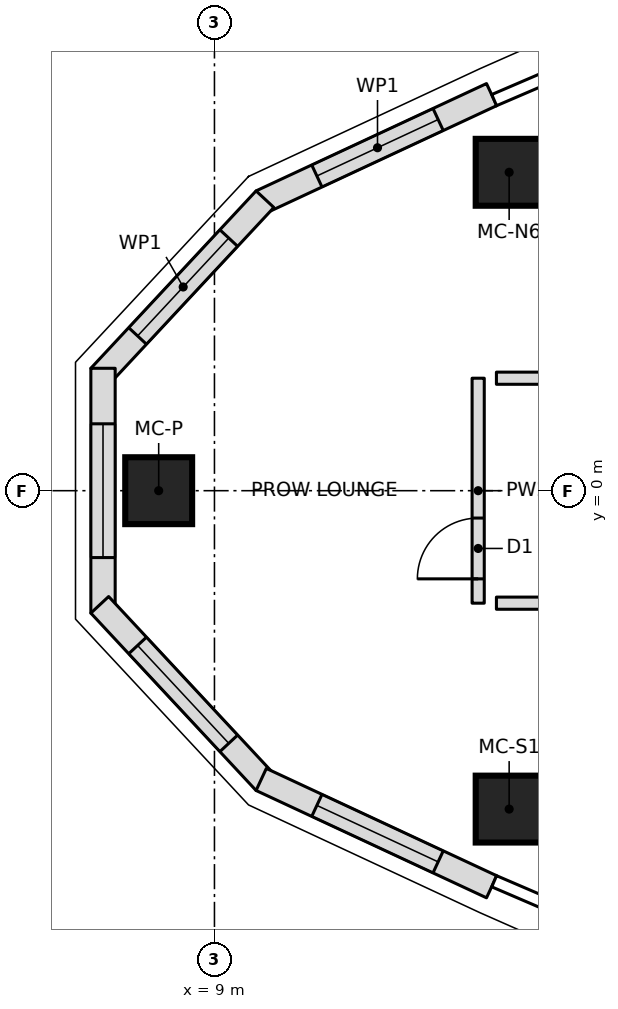
"""IFC4 building model, lengths in metres.
Left out: names, types, materials, properties, quantities, classifications, styles, units other than length and angle.
Written with IfcOpenShell. Run it as: python <this file> out.ifc"""

import sys

from ifc_helpers import new_model, si_unit, direction, frame, frame_2d, origin, origin_2d, place, context, subcontext, project, spatial, polyline, rectangle, outline, extrude, element, fill, save


model = new_model("IFC4")
c1 = context("Model", 3, precision=1e-05, world=origin(), true_north=direction((0.0, 1.0)))
c2 = subcontext(c1, "Body", "Model", "MODEL_VIEW")
j1 = project(units=[si_unit("LENGTHUNIT", "METRE"), si_unit("PLANEANGLEUNIT", "RADIAN")], contexts=[c1])
p1 = place(None, origin())
s1 = spatial("IfcSite", under=j1, at=p1, CompositionType="ELEMENT")
p2 = place(p1, origin())
s2 = spatial("IfcBuilding", under=s1, at=p2, CompositionType="ELEMENT")
p3 = place(p2, frame((0.0, 0.0, 296.3)))
s3 = spatial("IfcBuildingStorey", under=s2, at=p3, CompositionType="ELEMENT", Elevation=296.3)
for number, where, z_axis, x_axis in (
    (1, (8.083, 0.0, 0.0), (0.0, 0.0, 1.0), (1.0, 0.0, 0.0)),
    (2, (13.846, -5.237, 0.0), (0.0, 0.0, 1.0), (1.0, 0.0, 0.0)),
    (3, (13.846, 5.237, 0.0), (0.0, 0.0, 1.0), (1.0, 0.0, 0.0)),
):
    element("IfcColumn", number, at=place(p3, frame(where, z_axis=z_axis, x_axis=x_axis)), inside=s3, PredefinedType="COLUMN", context=c2, shape_type="SweptSolid", body=[
        extrude(rectangle(XDim=1.1, YDim=1.1, at=origin_2d()), origin(), (0.0, 0.0, 1.0), 3.55),
    ])
p4 = place(p3, frame((13.559, 6.515, 0.0), z_axis=(0.0, 0.0, 1.0), x_axis=(-0.906485602396, -0.42223672584, 0.0)))
e4 = element("IfcWall", 4, at=p4, inside=s3, PredefinedType="NOTDEFINED", context=c2, shape_type="SweptSolid", body=[
    extrude(outline(polyline([(0.0, -0.2), (4.181, -0.2), (4.103, 0.2), (0.0, 0.2), (0.0, -0.2)])), origin(), (0.0, 0.0, 1.0), 3.25),
])
p5 = place(p4, frame((0.971, 0.0, 0.6)))
e5 = element("IfcOpeningElement", 5, at=p5, cuts=e4, PredefinedType="OPENING", context=c2, shape_type="SweptSolid", body=[
    extrude(outline(polyline([(0.0, 1.35), (0.084, 1.771), (0.322, 2.128), (0.679, 2.366), (1.1, 2.45), (1.521, 2.366), (1.878, 2.128), (2.116, 1.771), (2.2, 1.35), (2.2, 1.1), (2.116, 0.679), (1.878, 0.322), (1.521, 0.084), (1.1, 0.0), (0.679, 0.084), (0.322, 0.322), (0.084, 0.679), (0.0, 1.1), (0.0, 1.35)])), frame((0.0, 0.21, 0.0), z_axis=(0.0, -1.0, 0.0), x_axis=(1.0, 0.0, 0.0)), (0.0, 0.0, 1.0), 0.42),
])
p6 = place(p3, frame((9.804, 4.766, 0.0), z_axis=(0.0, 0.0, 1.0), x_axis=(-0.6815467277, -0.73177459505, 0.0)))
e6 = element("IfcWall", 6, at=p6, inside=s3, PredefinedType="NOTDEFINED", context=c2, shape_type="SweptSolid", body=[
    extrude(outline(polyline([(-0.039, -0.2), (3.948, -0.2), (3.791, 0.2), (0.039, 0.2), (-0.039, -0.2)])), origin(), (0.0, 0.0, 1.0), 3.25),
])
p7 = place(p6, frame((0.835, 0.0, 0.6)))
e7 = element("IfcOpeningElement", 7, at=p7, cuts=e6, PredefinedType="OPENING", context=c2, shape_type="SweptSolid", body=[
    extrude(outline(polyline([(0.0, 1.35), (0.084, 1.771), (0.322, 2.128), (0.679, 2.366), (1.1, 2.45), (1.521, 2.366), (1.878, 2.128), (2.116, 1.771), (2.2, 1.35), (2.2, 1.1), (2.116, 0.679), (1.878, 0.322), (1.521, 0.084), (1.1, 0.0), (0.679, 0.084), (0.322, 0.322), (0.084, 0.679), (0.0, 1.1), (0.0, 1.35)])), frame((0.0, 0.21, 0.0), z_axis=(0.0, -1.0, 0.0), x_axis=(1.0, 0.0, 0.0)), (0.0, 0.0, 1.0), 0.42),
])
p8 = place(p3, frame((7.167, 1.935, 0.0), z_axis=(0.0, 0.0, 1.0), x_axis=(0.0, -1.0, 0.0)))
e8 = element("IfcWall", 8, at=p8, inside=s3, PredefinedType="NOTDEFINED", context=c2, shape_type="SweptSolid", body=[
    extrude(outline(polyline([(-0.079, -0.2), (3.948, -0.2), (3.791, 0.2), (0.079, 0.2), (-0.079, -0.2)])), origin(), (0.0, 0.0, 1.0), 3.25),
])
p9 = place(p8, frame((0.835, 0.0, 0.6)))
e9 = element("IfcOpeningElement", 9, at=p9, cuts=e8, PredefinedType="OPENING", context=c2, shape_type="SweptSolid", body=[
    extrude(outline(polyline([(0.0, 1.35), (0.084, 1.771), (0.322, 2.128), (0.679, 2.366), (1.1, 2.45), (1.521, 2.366), (1.878, 2.128), (2.116, 1.771), (2.2, 1.35), (2.2, 1.1), (2.116, 0.679), (1.878, 0.322), (1.521, 0.084), (1.1, 0.0), (0.679, 0.084), (0.322, 0.322), (0.084, 0.679), (0.0, 1.1), (0.0, 1.35)])), frame((0.0, 0.21, 0.0), z_axis=(0.0, -1.0, 0.0), x_axis=(1.0, 0.0, 0.0)), (0.0, 0.0, 1.0), 0.42),
])
p10 = place(p3, frame((7.167, -1.935, 0.0), z_axis=(0.0, 0.0, 1.0), x_axis=(0.6815467277, -0.73177459505, 0.0)))
e10 = element("IfcWall", 10, at=p10, inside=s3, PredefinedType="NOTDEFINED", context=c2, shape_type="SweptSolid", body=[
    extrude(outline(polyline([(-0.079, -0.2), (3.908, -0.2), (3.83, 0.2), (0.079, 0.2), (-0.079, -0.2)])), origin(), (0.0, 0.0, 1.0), 3.25),
])
p11 = place(p10, frame((0.835, 0.0, 0.6)))
e11 = element("IfcOpeningElement", 11, at=p11, cuts=e10, PredefinedType="OPENING", context=c2, shape_type="SweptSolid", body=[
    extrude(outline(polyline([(0.0, 1.35), (0.084, 1.771), (0.322, 2.128), (0.679, 2.366), (1.1, 2.45), (1.521, 2.366), (1.878, 2.128), (2.116, 1.771), (2.2, 1.35), (2.2, 1.1), (2.116, 0.679), (1.878, 0.322), (1.521, 0.084), (1.1, 0.0), (0.679, 0.084), (0.322, 0.322), (0.084, 0.679), (0.0, 1.1), (0.0, 1.35)])), frame((0.0, 0.21, 0.0), z_axis=(0.0, -1.0, 0.0), x_axis=(1.0, 0.0, 0.0)), (0.0, 0.0, 1.0), 0.42),
])
p12 = place(p3, frame((9.804, -4.766, 0.0), z_axis=(0.0, 0.0, 1.0), x_axis=(0.906485602396, -0.42223672584, 0.0)))
e12 = element("IfcWall", 12, at=p12, inside=s3, PredefinedType="NOTDEFINED", context=c2, shape_type="SweptSolid", body=[
    extrude(outline(polyline([(-0.039, -0.2), (4.142, -0.2), (4.142, 0.2), (0.039, 0.2), (-0.039, -0.2)])), origin(), (0.0, 0.0, 1.0), 3.25),
])
p13 = place(p12, frame((0.971, 0.0, 0.6)))
e13 = element("IfcOpeningElement", 13, at=p13, cuts=e12, PredefinedType="OPENING", context=c2, shape_type="SweptSolid", body=[
    extrude(outline(polyline([(0.0, 1.35), (0.084, 1.771), (0.322, 2.128), (0.679, 2.366), (1.1, 2.45), (1.521, 2.366), (1.878, 2.128), (2.116, 1.771), (2.2, 1.35), (2.2, 1.1), (2.116, 0.679), (1.878, 0.322), (1.521, 0.084), (1.1, 0.0), (0.679, 0.084), (0.322, 0.322), (0.084, 0.679), (0.0, 1.1), (0.0, 1.35)])), frame((0.0, 0.21, 0.0), z_axis=(0.0, -1.0, 0.0), x_axis=(1.0, 0.0, 0.0)), (0.0, 0.0, 1.0), 0.42),
])
p14 = place(p3, frame((13.637, 1.85, 0.0), z_axis=(0.0, 0.0, 1.0), x_axis=(1.0, 0.0, 0.0)))
e14 = element("IfcWall", 14, at=p14, inside=s3, PredefinedType="PARTITIONING", context=c2, shape_type="SweptSolid", body=[
    extrude(rectangle(XDim=9.549, YDim=0.2, at=frame_2d((4.774, 0.0))), origin(), (0.0, 0.0, 1.0), 3.25),
])
p15 = place(p14, frame((4.274, 0.0, 0.0)))
e15 = element("IfcOpeningElement", 15, at=p15, cuts=e14, PredefinedType="OPENING", context=c2, shape_type="SweptSolid", body=[
    extrude(rectangle(XDim=1.0, YDim=2.1, at=frame_2d((0.5, 1.05))), frame((0.0, 0.11, 0.0), z_axis=(0.0, -1.0, 0.0), x_axis=(1.0, 0.0, 0.0)), (0.0, 0.0, 1.0), 0.22),
])
p16 = place(p3, frame((13.637, -1.85, 0.0), z_axis=(0.0, 0.0, 1.0), x_axis=(1.0, 0.0, 0.0)))
e16 = element("IfcWall", 16, at=p16, inside=s3, PredefinedType="PARTITIONING", context=c2, shape_type="SweptSolid", body=[
    extrude(rectangle(XDim=9.549, YDim=0.2, at=frame_2d((4.774, 0.0))), origin(), (0.0, 0.0, 1.0), 3.25),
])
p17 = place(p16, frame((4.274, 0.0, 0.0)))
e17 = element("IfcOpeningElement", 17, at=p17, cuts=e16, PredefinedType="OPENING", context=c2, shape_type="SweptSolid", body=[
    extrude(rectangle(XDim=1.0, YDim=2.1, at=frame_2d((0.5, 1.05))), frame((0.0, 0.11, 0.0), z_axis=(0.0, -1.0, 0.0), x_axis=(1.0, 0.0, 0.0)), (0.0, 0.0, 1.0), 0.22),
])
p18 = place(p3, frame((13.337, -1.85, 0.0), z_axis=(0.0, 0.0, 1.0), x_axis=(0.0, 1.0, 0.0)))
e18 = element("IfcWall", 18, at=p18, inside=s3, PredefinedType="PARTITIONING", context=c2, shape_type="SweptSolid", body=[
    extrude(rectangle(XDim=3.7, YDim=0.2, at=frame_2d((1.85, 0.0))), origin(), (0.0, 0.0, 1.0), 3.25),
])
p19 = place(p18, frame((0.4, 0.0, 0.0)))
e19 = element("IfcOpeningElement", 19, at=p19, cuts=e18, PredefinedType="OPENING", context=c2, shape_type="SweptSolid", body=[
    extrude(rectangle(XDim=1.0, YDim=2.1, at=frame_2d((0.5, 1.05))), frame((0.0, 0.11, 0.0), z_axis=(0.0, -1.0, 0.0), x_axis=(1.0, 0.0, 0.0)), (0.0, 0.0, 1.0), 0.22),
])
p20 = place(p5, origin())
e20 = element("IfcWindow", 20, at=p20, inside=s3, PartitioningType="SINGLE_PANEL", PredefinedType="WINDOW", context=c2, shape_type="SweptSolid", body=[
    extrude(outline(polyline([(0.0, 1.35), (0.084, 1.771), (0.322, 2.128), (0.679, 2.366), (1.1, 2.45), (1.521, 2.366), (1.878, 2.128), (2.116, 1.771), (2.2, 1.35), (2.2, 1.1), (2.116, 0.679), (1.878, 0.322), (1.521, 0.084), (1.1, 0.0), (0.679, 0.084), (0.322, 0.322), (0.084, 0.679), (0.0, 1.1), (0.0, 1.35)])), frame((0.0, 0.17, 0.0), z_axis=(0.0, -1.0, 0.0), x_axis=(1.0, 0.0, 0.0)), (0.0, 0.0, 1.0), 0.06),
])
fill(e5, e20)
p21 = place(p7, origin())
e21 = element("IfcWindow", 21, at=p21, inside=s3, PartitioningType="SINGLE_PANEL", PredefinedType="WINDOW", context=c2, shape_type="SweptSolid", body=[
    extrude(outline(polyline([(0.0, 1.35), (0.084, 1.771), (0.322, 2.128), (0.679, 2.366), (1.1, 2.45), (1.521, 2.366), (1.878, 2.128), (2.116, 1.771), (2.2, 1.35), (2.2, 1.1), (2.116, 0.679), (1.878, 0.322), (1.521, 0.084), (1.1, 0.0), (0.679, 0.084), (0.322, 0.322), (0.084, 0.679), (0.0, 1.1), (0.0, 1.35)])), frame((0.0, 0.17, 0.0), z_axis=(0.0, -1.0, 0.0), x_axis=(1.0, 0.0, 0.0)), (0.0, 0.0, 1.0), 0.06),
])
fill(e7, e21)
p22 = place(p9, origin())
e22 = element("IfcWindow", 22, at=p22, inside=s3, PartitioningType="SINGLE_PANEL", PredefinedType="WINDOW", context=c2, shape_type="SweptSolid", body=[
    extrude(outline(polyline([(0.0, 1.35), (0.084, 1.771), (0.322, 2.128), (0.679, 2.366), (1.1, 2.45), (1.521, 2.366), (1.878, 2.128), (2.116, 1.771), (2.2, 1.35), (2.2, 1.1), (2.116, 0.679), (1.878, 0.322), (1.521, 0.084), (1.1, 0.0), (0.679, 0.084), (0.322, 0.322), (0.084, 0.679), (0.0, 1.1), (0.0, 1.35)])), frame((0.0, 0.17, 0.0), z_axis=(0.0, -1.0, 0.0), x_axis=(1.0, 0.0, 0.0)), (0.0, 0.0, 1.0), 0.06),
])
fill(e9, e22)
p23 = place(p11, origin())
e23 = element("IfcWindow", 23, at=p23, inside=s3, PartitioningType="SINGLE_PANEL", PredefinedType="WINDOW", context=c2, shape_type="SweptSolid", body=[
    extrude(outline(polyline([(0.0, 1.35), (0.084, 1.771), (0.322, 2.128), (0.679, 2.366), (1.1, 2.45), (1.521, 2.366), (1.878, 2.128), (2.116, 1.771), (2.2, 1.35), (2.2, 1.1), (2.116, 0.679), (1.878, 0.322), (1.521, 0.084), (1.1, 0.0), (0.679, 0.084), (0.322, 0.322), (0.084, 0.679), (0.0, 1.1), (0.0, 1.35)])), frame((0.0, 0.17, 0.0), z_axis=(0.0, -1.0, 0.0), x_axis=(1.0, 0.0, 0.0)), (0.0, 0.0, 1.0), 0.06),
])
fill(e11, e23)
p24 = place(p13, origin())
e24 = element("IfcWindow", 24, at=p24, inside=s3, PartitioningType="SINGLE_PANEL", PredefinedType="WINDOW", context=c2, shape_type="SweptSolid", body=[
    extrude(outline(polyline([(0.0, 1.35), (0.084, 1.771), (0.322, 2.128), (0.679, 2.366), (1.1, 2.45), (1.521, 2.366), (1.878, 2.128), (2.116, 1.771), (2.2, 1.35), (2.2, 1.1), (2.116, 0.679), (1.878, 0.322), (1.521, 0.084), (1.1, 0.0), (0.679, 0.084), (0.322, 0.322), (0.084, 0.679), (0.0, 1.1), (0.0, 1.35)])), frame((0.0, 0.17, 0.0), z_axis=(0.0, -1.0, 0.0), x_axis=(1.0, 0.0, 0.0)), (0.0, 0.0, 1.0), 0.06),
])
fill(e13, e24)
p25 = place(p19, origin())
e25 = element("IfcDoor", 25, at=p25, inside=s3, OperationType="SINGLE_SWING_LEFT", PredefinedType="DOOR", context=c2, shape_type="SweptSolid", body=[
    extrude(rectangle(XDim=1.0, YDim=2.1, at=frame_2d((0.5, 1.05))), frame((0.0, 0.025, 0.0), z_axis=(0.0, -1.0, 0.0), x_axis=(1.0, 0.0, 0.0)), (0.0, 0.0, 1.0), 0.05),
])
fill(e19, e25)
save(model, sys.argv[1])
